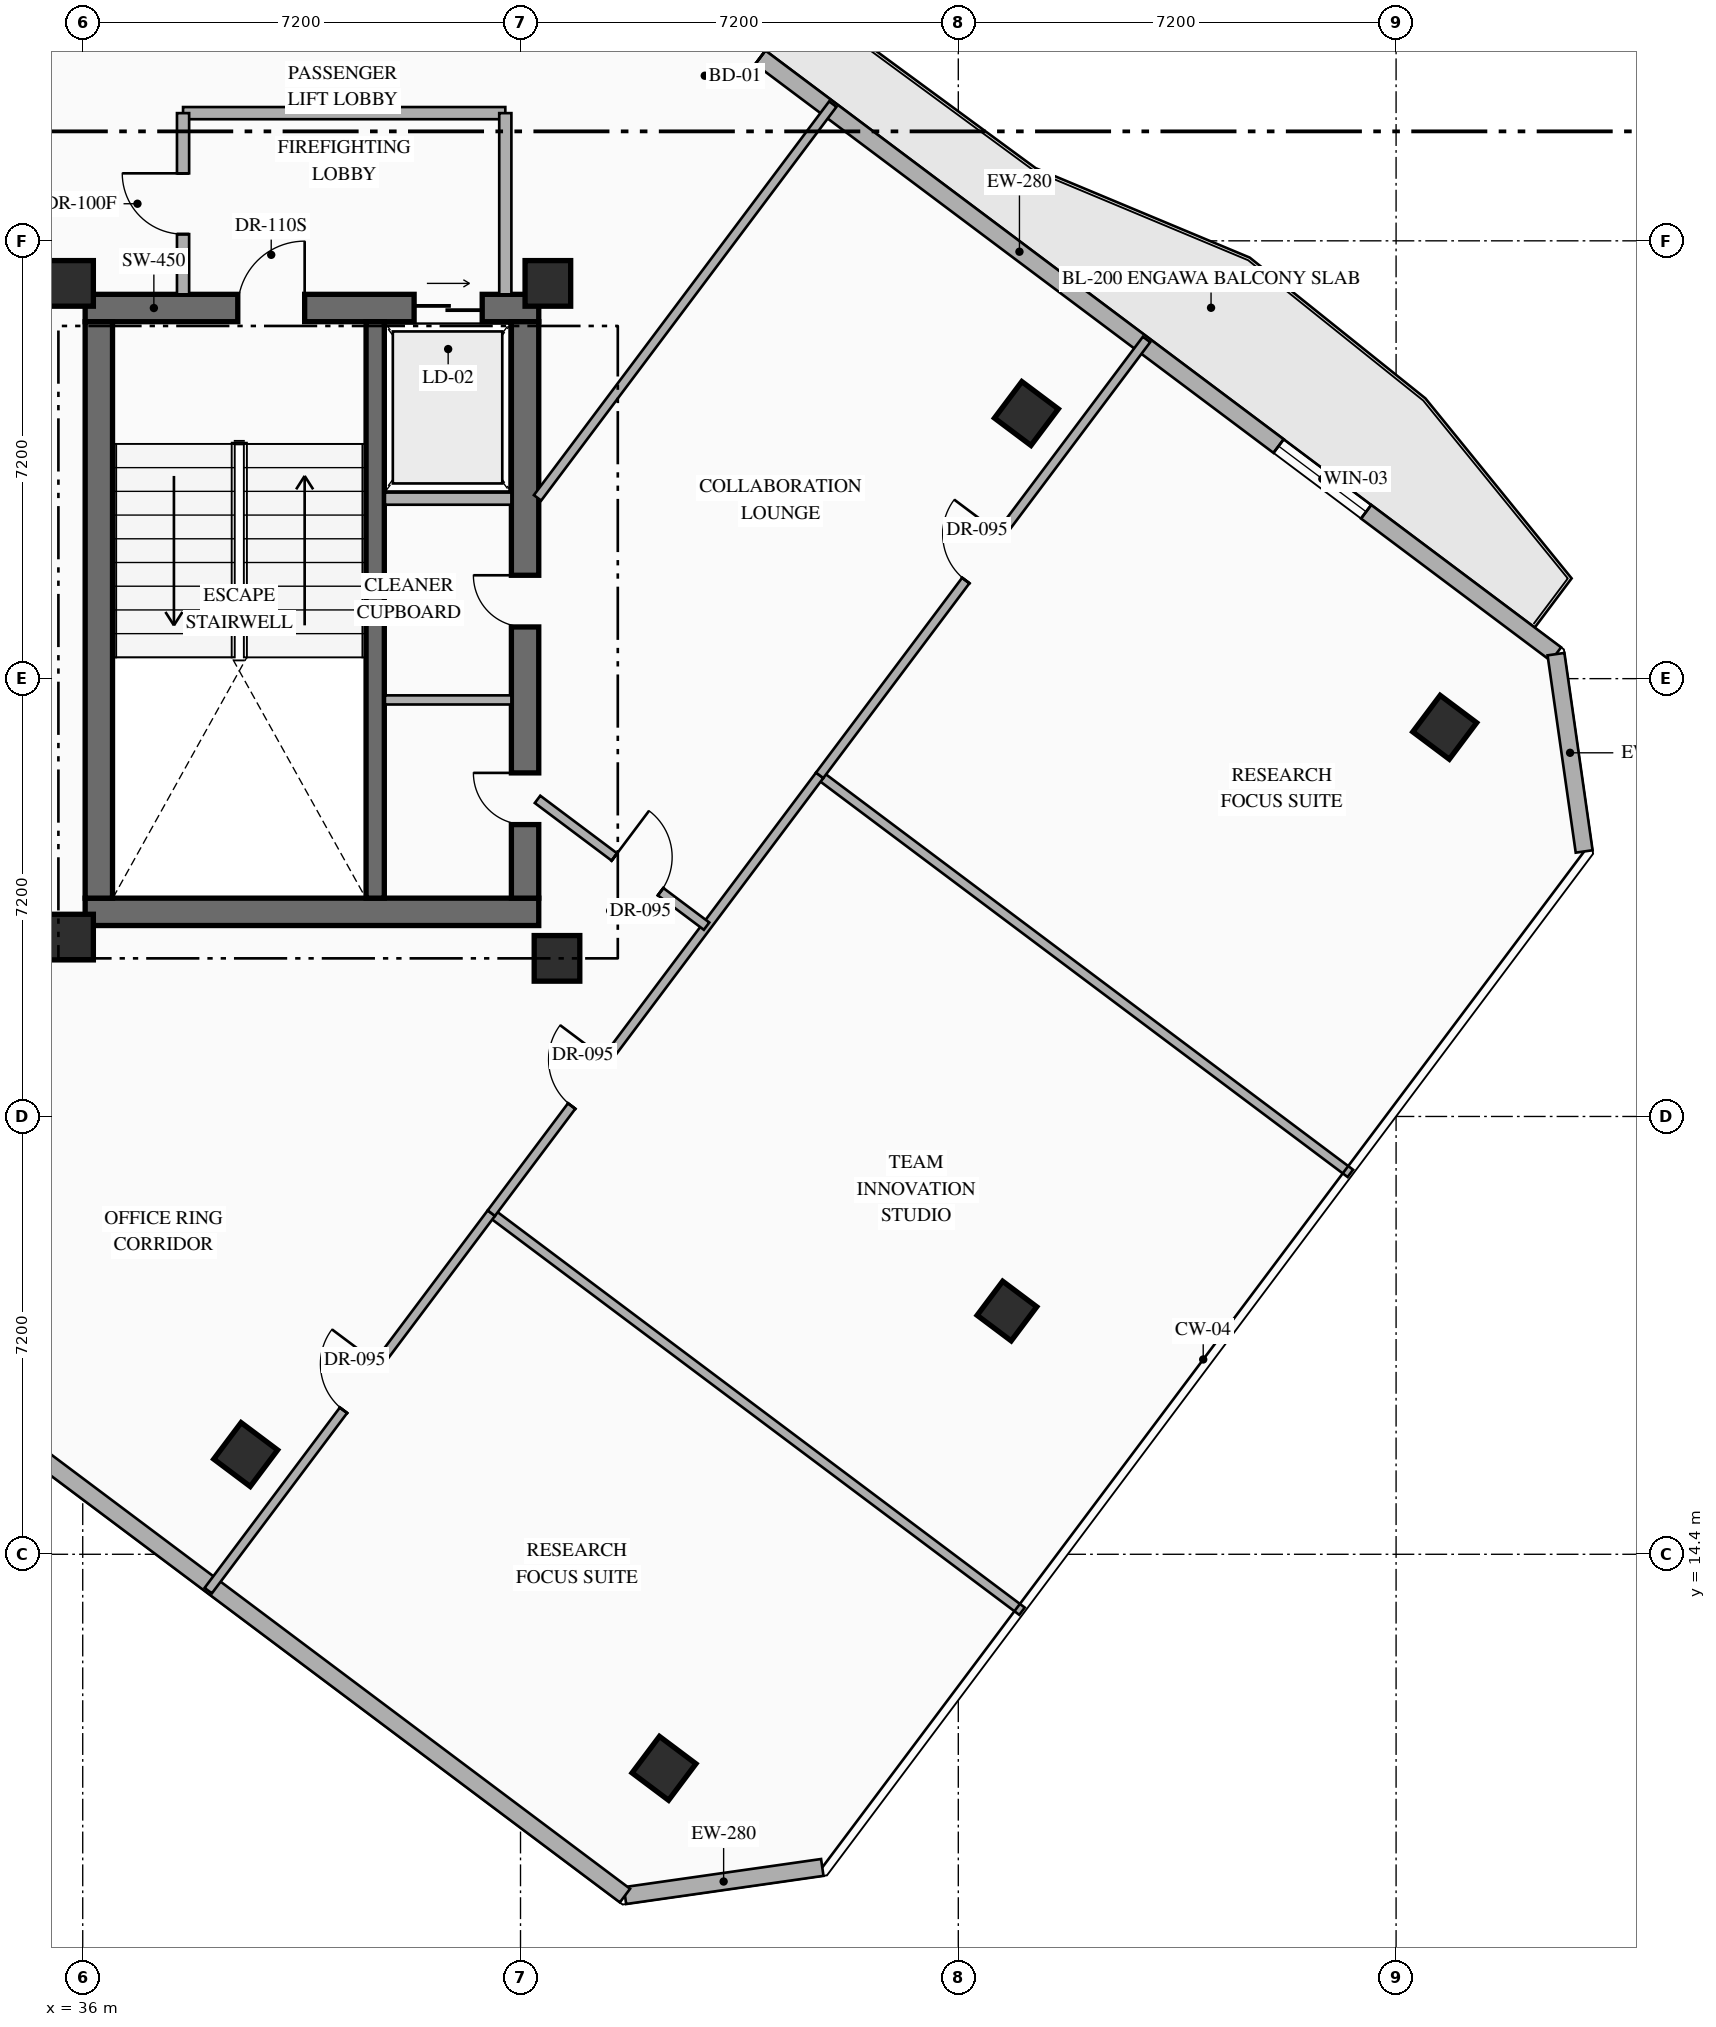
"""IFC4 building model, lengths in metres.
Left out: names, types, materials, properties, quantities, classifications, styles, units other than length and angle.
Written with IfcOpenShell. Run it as: python <this file> out.ifc"""

import sys

from ifc_helpers import new_model, si_unit, direction, frame, frame_2d, origin, origin_2d, place, context, subcontext, project, spatial, rectangle, hollow_rectangle, extrude, element, fill, save


model = new_model("IFC4")
c1 = context("Model", 3, precision=1e-05, world=origin(), true_north=direction((0.0, 1.0)))
c2 = subcontext(c1, "Body", "Model", "MODEL_VIEW")
j1 = project(units=[si_unit("LENGTHUNIT", "METRE"), si_unit("PLANEANGLEUNIT", "RADIAN")], contexts=[c1])
p1 = place(None, origin())
s1 = spatial("IfcSite", under=j1, at=p1, CompositionType="ELEMENT")
p2 = place(p1, origin())
s2 = spatial("IfcBuilding", under=s1, at=p2, CompositionType="ELEMENT")
p3 = place(p2, frame((0.0, 0.0, 213.15)))
s3 = spatial("IfcBuildingStorey", under=s2, at=p3, CompositionType="ELEMENT", Elevation=213.15)
p4 = place(p3, frame((36.04, 24.965, 0.0), z_axis=(0.0, 0.0, 1.0), x_axis=(1.0, 0.0, 0.0)))
e1 = element("IfcWall", 1, at=p4, inside=s3, PredefinedType="SHEAR", context=c2, shape_type="SweptSolid", body=[
    extrude(rectangle(XDim=7.46, YDim=0.45, at=frame_2d((3.73, 0.0))), origin(), (0.0, 0.0, 1.0), 3.6),
])
p5 = place(p3, frame((36.04, 34.895, 0.0), z_axis=(0.0, 0.0, 1.0), x_axis=(1.0, 0.0, 0.0)))
e2 = element("IfcWall", 2, at=p5, inside=s3, PredefinedType="SHEAR", context=c2, shape_type="SweptSolid", body=[
    extrude(rectangle(XDim=7.46, YDim=0.45, at=frame_2d((3.73, 0.0))), origin(), (0.0, 0.0, 1.0), 3.6),
])
p6 = place(p5, frame((2.51, 0.0, 0.0)))
e3 = element("IfcOpeningElement", 3, at=p6, cuts=e2, PredefinedType="OPENING", context=c2, shape_type="SweptSolid", body=[
    extrude(rectangle(XDim=1.1, YDim=2.2, at=frame_2d((0.55, 1.1))), frame((0.0, 0.235, 0.0), z_axis=(0.0, -1.0, 0.0), x_axis=(1.0, 0.0, 0.0)), (0.0, 0.0, 1.0), 0.47),
])
p7 = place(p5, frame((5.41, 0.0, 0.0)))
e4 = element("IfcOpeningElement", 4, at=p7, cuts=e2, PredefinedType="OPENING", context=c2, shape_type="SweptSolid", body=[
    extrude(rectangle(XDim=1.12, YDim=2.15, at=frame_2d((0.56, 1.075))), frame((0.0, 0.235, 0.0), z_axis=(0.0, -1.0, 0.0), x_axis=(1.0, 0.0, 0.0)), (0.0, 0.0, 1.0), 0.47),
])
p8 = place(p3, frame((36.265, 25.19, 0.0), z_axis=(0.0, 0.0, 1.0), x_axis=(0.0, 1.0, 0.0)))
e5 = element("IfcWall", 5, at=p8, inside=s3, PredefinedType="SHEAR", context=c2, shape_type="SweptSolid", body=[
    extrude(rectangle(XDim=9.48, YDim=0.45, at=frame_2d((4.74, 0.0))), origin(), (0.0, 0.0, 1.0), 3.6),
])
p9 = place(p3, frame((43.275, 25.19, 0.0), z_axis=(0.0, 0.0, 1.0), x_axis=(0.0, 1.0, 0.0)))
e6 = element("IfcWall", 6, at=p9, inside=s3, PredefinedType="SHEAR", context=c2, shape_type="SweptSolid", body=[
    extrude(rectangle(XDim=9.48, YDim=0.45, at=frame_2d((4.74, 0.0))), origin(), (0.0, 0.0, 1.0), 3.6),
])
p10 = place(p9, frame((1.21, 0.0, 0.0)))
e7 = element("IfcOpeningElement", 7, at=p10, cuts=e6, PredefinedType="OPENING", context=c2, shape_type="SweptSolid", body=[
    extrude(rectangle(XDim=0.85, YDim=2.08, at=frame_2d((0.425, 1.04))), frame((0.0, 0.235, 0.0), z_axis=(0.0, -1.0, 0.0), x_axis=(1.0, 0.0, 0.0)), (0.0, 0.0, 1.0), 0.47),
])
p11 = place(p9, frame((4.46, 0.0, 0.0)))
e8 = element("IfcOpeningElement", 8, at=p11, cuts=e6, PredefinedType="OPENING", context=c2, shape_type="SweptSolid", body=[
    extrude(rectangle(XDim=0.85, YDim=2.08, at=frame_2d((0.425, 1.04))), frame((0.0, 0.235, 0.0), z_axis=(0.0, -1.0, 0.0), x_axis=(1.0, 0.0, 0.0)), (0.0, 0.0, 1.0), 0.47),
])
p12 = place(p3, frame((40.81, 25.19, 0.0), z_axis=(0.0, 0.0, 1.0), x_axis=(0.0, 1.0, 0.0)))
e9 = element("IfcWall", 9, at=p12, inside=s3, PredefinedType="SHEAR", context=c2, shape_type="SweptSolid", body=[
    extrude(rectangle(XDim=9.48, YDim=0.3, at=frame_2d((4.74, 0.0))), origin(), (0.0, 0.0, 1.0), 3.6),
])
for number, where, z_axis, x_axis in (
    (10, (35.8, 24.55, 0.0), (0.0, 0.0, 1.0), (1.0, 0.0, 0.0)),
    (11, (43.8, 24.2, 0.0), (0.0, 0.0, 1.0), (1.0, 0.0, 0.0)),
    (12, (35.8, 35.3, 0.0), (0.0, 0.0, 1.0), (1.0, 0.0, 0.0)),
    (13, (43.65, 35.3, 0.0), (0.0, 0.0, 1.0), (1.0, 0.0, 0.0)),
    (14, (38.68, 16.04, 0.0), (0.0, 0.0, 1.0), (0.8, -0.6, 0.0)),
    (15, (51.52, 33.16, 0.0), (0.0, 0.0, 1.0), (0.8, -0.6, 0.0)),
    (16, (45.56, 10.88, 0.0), (0.0, 0.0, 1.0), (0.8, -0.6, 0.0)),
    (17, (58.4, 28.0, 0.0), (0.0, 0.0, 1.0), (0.8, -0.6, 0.0)),
):
    element("IfcColumn", number, at=place(p3, frame(where, z_axis=z_axis, x_axis=x_axis)), inside=s3, PredefinedType="COLUMN", context=c2, shape_type="SweptSolid", body=[
        extrude(hollow_rectangle(XDim=0.75, YDim=0.75, WallThickness=0.028, at=origin_2d()), origin(), (0.0, 0.0, 1.0), 3.6),
    ])
p13 = place(p3, frame((51.2, 18.4, 0.0), z_axis=(0.0, 0.0, 1.0), x_axis=(0.799999996291, -0.600000004945, 0.0)))
e18 = element("IfcColumn", 18, at=p13, inside=s3, PredefinedType="COLUMN", context=c2, shape_type="SweptSolid", body=[
    extrude(hollow_rectangle(XDim=0.7, YDim=0.7, WallThickness=0.028, at=origin_2d()), origin(), (0.0, 0.0, 1.0), 3.6),
])
p14 = place(p3, frame((44.86, 40.73, 0.0), z_axis=(0.0, 0.0, 1.0), x_axis=(0.800007624502, -0.599989833863, 0.0)))
e19 = element("IfcWall", 19, at=p14, inside=s3, PredefinedType="STANDARD", context=c2, shape_type="SweptSolid", body=[
    extrude(rectangle(XDim=19.212, YDim=0.28, at=frame_2d((9.606, 0.0))), origin(), (0.0, 0.0, 1.0), 3.35),
])
p15 = place(p14, frame((1.755, 0.0, 0.0)))
e20 = element("IfcOpeningElement", 20, at=p15, cuts=e19, PredefinedType="OPENING", context=c2, shape_type="SweptSolid", body=[
    extrude(rectangle(XDim=1.1, YDim=2.2, at=frame_2d((0.55, 1.1))), frame((0.0, 0.15, 0.0), z_axis=(0.0, -1.0, 0.0), x_axis=(1.0, 0.0, 0.0)), (0.0, 0.0, 1.0), 0.3),
])
p16 = place(p14, frame((13.509, 0.0, 0.85)))
e21 = element("IfcOpeningElement", 21, at=p16, cuts=e19, PredefinedType="OPENING", context=c2, shape_type="SweptSolid", body=[
    extrude(rectangle(XDim=1.8, YDim=2.1, at=frame_2d((0.9, 1.05))), frame((0.0, 0.15, 0.0), z_axis=(0.0, -1.0, 0.0), x_axis=(1.0, 0.0, 0.0)), (0.0, 0.0, 1.0), 0.3),
])
p17 = place(p3, frame((60.23, 29.203, 0.0), z_axis=(0.0, 0.0, 1.0), x_axis=(0.141296221922, -0.989967361922, 0.0)))
e22 = element("IfcWall", 22, at=p17, inside=s3, PredefinedType="STANDARD", context=c2, shape_type="SweptSolid", body=[
    extrude(rectangle(XDim=3.278, YDim=0.28, at=frame_2d((1.639, 0.0))), origin(), (0.0, 0.0, 1.0), 3.35),
])
p18 = place(p3, frame((48.163, 9.25, 0.0), z_axis=(0.0, 0.0, 1.0), x_axis=(-0.989979263428, -0.141212810973, 0.0)))
e23 = element("IfcWall", 23, at=p18, inside=s3, PredefinedType="STANDARD", context=c2, shape_type="SweptSolid", body=[
    extrude(rectangle(XDim=3.278, YDim=0.28, at=frame_2d((1.639, 0.0))), origin(), (0.0, 0.0, 1.0), 3.35),
])
p19 = place(p3, frame((44.918, 8.787, 0.0), z_axis=(0.0, 0.0, 1.0), x_axis=(-0.800004765927, 0.599993645378, 0.0)))
e24 = element("IfcWall", 24, at=p19, inside=s3, PredefinedType="STANDARD", context=c2, shape_type="SweptSolid", body=[
    extrude(rectangle(XDim=24.588, YDim=0.28, at=frame_2d((12.294, 0.0))), origin(), (0.0, 0.0, 1.0), 3.35),
])
p20 = place(p3, frame((40.97, 31.76, 0.0), z_axis=(0.0, 0.0, 1.0), x_axis=(1.0, 0.0, 0.0)))
e25 = element("IfcWall", 25, at=p20, inside=s3, PredefinedType="STANDARD", context=c2, shape_type="SweptSolid", body=[
    extrude(rectangle(XDim=2.08, YDim=0.2, at=frame_2d((1.04, 0.0))), origin(), (0.0, 0.0, 1.0), 3.35),
])
p21 = place(p3, frame((40.97, 28.45, 0.0), z_axis=(0.0, 0.0, 1.0), x_axis=(1.0, 0.0, 0.0)))
e26 = element("IfcWall", 26, at=p21, inside=s3, PredefinedType="PARTITIONING", context=c2, shape_type="SweptSolid", body=[
    extrude(rectangle(XDim=2.08, YDim=0.15, at=frame_2d((1.04, 0.0))), origin(), (0.0, 0.0, 1.0), 3.35),
])
p22 = place(p3, frame((37.65, 38.1, 0.0), z_axis=(0.0, 0.0, 1.0), x_axis=(1.0, 0.0, 0.0)))
e27 = element("IfcWall", 27, at=p22, inside=s3, PredefinedType="STANDARD", context=c2, shape_type="SweptSolid", body=[
    extrude(rectangle(XDim=5.3, YDim=0.2, at=frame_2d((2.65, 0.0))), origin(), (0.0, 0.0, 1.0), 3.35),
])
p23 = place(p3, frame((42.95, 35.12, 0.0), z_axis=(0.0, 0.0, 1.0), x_axis=(0.0, 1.0, 0.0)))
e28 = element("IfcWall", 28, at=p23, inside=s3, PredefinedType="STANDARD", context=c2, shape_type="SweptSolid", body=[
    extrude(rectangle(XDim=2.98, YDim=0.2, at=frame_2d((1.49, 0.0))), origin(), (0.0, 0.0, 1.0), 3.35),
])
p24 = place(p3, frame((37.65, 35.12, 0.0), z_axis=(0.0, 0.0, 1.0), x_axis=(0.0, 1.0, 0.0)))
e29 = element("IfcWall", 29, at=p24, inside=s3, PredefinedType="STANDARD", context=c2, shape_type="SweptSolid", body=[
    extrude(rectangle(XDim=2.98, YDim=0.2, at=frame_2d((1.49, 0.0))), origin(), (0.0, 0.0, 1.0), 3.35),
])
p25 = place(p24, frame((0.99, 0.0, 0.0)))
e30 = element("IfcOpeningElement", 30, at=p25, cuts=e29, PredefinedType="OPENING", context=c2, shape_type="SweptSolid", body=[
    extrude(rectangle(XDim=1.0, YDim=2.2, at=frame_2d((0.5, 1.1))), frame((0.0, 0.11, 0.0), z_axis=(0.0, -1.0, 0.0), x_axis=(1.0, 0.0, 0.0)), (0.0, 0.0, 1.0), 0.22),
])
p26 = place(p3, frame((42.72, 20.01, 0.0), z_axis=(0.0, 0.0, 1.0), x_axis=(0.800005370633, -0.599992839089, 0.0)))
e31 = element("IfcWall", 31, at=p26, inside=s3, PredefinedType="PARTITIONING", context=c2, shape_type="SweptSolid", body=[
    extrude(rectangle(XDim=10.91, YDim=0.15, at=frame_2d((5.455, 0.0))), origin(), (0.0, 0.0, 1.0), 3.35),
])
p27 = place(p3, frame((38.064, 13.802, 0.0), z_axis=(0.0, 0.0, 1.0), x_axis=(0.6, 0.8, 0.0)))
e32 = element("IfcWall", 32, at=p27, inside=s3, PredefinedType="PARTITIONING", context=c2, shape_type="SweptSolid", body=[
    extrude(rectangle(XDim=7.76, YDim=0.15, at=frame_2d((3.88, 0.0))), origin(), (0.0, 0.0, 1.0), 3.35),
])
p28 = place(p27, frame((3.708, 0.0, 0.0)))
e33 = element("IfcOpeningElement", 33, at=p28, cuts=e32, PredefinedType="OPENING", context=c2, shape_type="SweptSolid", body=[
    extrude(rectangle(XDim=0.95, YDim=2.15, at=frame_2d((0.475, 1.075))), frame((0.0, 0.085, 0.0), z_axis=(0.0, -1.0, 0.0), x_axis=(1.0, 0.0, 0.0)), (0.0, 0.0, 1.0), 0.17),
])
p29 = place(p3, frame((48.12, 27.21, 0.0), z_axis=(0.0, 0.0, 1.0), x_axis=(0.799997314611, -0.600003580502, 0.0)))
e34 = element("IfcWall", 34, at=p29, inside=s3, PredefinedType="PARTITIONING", context=c2, shape_type="SweptSolid", body=[
    extrude(rectangle(XDim=10.91, YDim=0.15, at=frame_2d((5.455, 0.0))), origin(), (0.0, 0.0, 1.0), 3.045),
])
p30 = place(p3, frame((42.72, 20.01, 0.0), z_axis=(0.0, 0.0, 1.0), x_axis=(0.600013020683, 0.799990234322, 0.0)))
e35 = element("IfcWall", 35, at=p30, inside=s3, PredefinedType="PARTITIONING", context=c2, shape_type="SweptSolid", body=[
    extrude(rectangle(XDim=9.0, YDim=0.15, at=frame_2d((4.5, 0.0))), origin(), (0.0, 0.0, 1.0), 3.35),
])
p31 = place(p30, frame((2.202, 0.0, 0.0)))
e36 = element("IfcOpeningElement", 36, at=p31, cuts=e35, PredefinedType="OPENING", context=c2, shape_type="SweptSolid", body=[
    extrude(rectangle(XDim=0.95, YDim=2.15, at=frame_2d((0.475, 1.075))), frame((0.0, 0.085, 0.0), z_axis=(0.0, -1.0, 0.0), x_axis=(1.0, 0.0, 0.0)), (0.0, 0.0, 1.0), 0.17),
])
p32 = place(p3, frame((48.12, 27.21, 0.0), z_axis=(0.0, 0.0, 1.0), x_axis=(0.6, 0.8, 0.0)))
e37 = element("IfcWall", 37, at=p32, inside=s3, PredefinedType="PARTITIONING", context=c2, shape_type="SweptSolid", body=[
    extrude(rectangle(XDim=8.96, YDim=0.15, at=frame_2d((4.48, 0.0))), origin(), (0.0, 0.0, 1.0), 3.35),
])
p33 = place(p32, frame((4.005, 0.0, 0.0)))
e38 = element("IfcOpeningElement", 38, at=p33, cuts=e37, PredefinedType="OPENING", context=c2, shape_type="SweptSolid", body=[
    extrude(rectangle(XDim=0.95, YDim=2.15, at=frame_2d((0.475, 1.075))), frame((0.0, 0.085, 0.0), z_axis=(0.0, -1.0, 0.0), x_axis=(1.0, 0.0, 0.0)), (0.0, 0.0, 1.0), 0.17),
])
p34 = place(p3, frame((43.48, 26.815, 0.0), z_axis=(0.0, 0.0, 1.0), x_axis=(0.800008430676, -0.599988758934, 0.0)))
e39 = element("IfcWall", 39, at=p34, inside=s3, PredefinedType="PARTITIONING", context=c2, shape_type="SweptSolid", body=[
    extrude(rectangle(XDim=3.475, YDim=0.15, at=frame_2d((1.738, 0.0))), origin(), (0.0, 0.0, 1.0), 3.35),
])
p35 = place(p34, frame((1.58, 0.0, 0.0)))
e40 = element("IfcOpeningElement", 40, at=p35, cuts=e39, PredefinedType="OPENING", context=c2, shape_type="SweptSolid", body=[
    extrude(rectangle(XDim=0.95, YDim=2.15, at=frame_2d((0.475, 1.075))), frame((0.0, 0.085, 0.0), z_axis=(0.0, -1.0, 0.0), x_axis=(1.0, 0.0, 0.0)), (0.0, 0.0, 1.0), 0.17),
])
p36 = place(p3, frame((43.48, 31.773, 0.0), z_axis=(0.0, 0.0, 1.0), x_axis=(0.599971041729, 0.800021717885, 0.0)))
e41 = element("IfcWall", 41, at=p36, inside=s3, PredefinedType="PARTITIONING", context=c2, shape_type="SweptSolid", body=[
    extrude(rectangle(XDim=8.094, YDim=0.15, at=frame_2d((4.047, 0.0))), origin(), (0.0, 0.0, 1.0), 3.35),
])
p37 = place(p15, origin())
e42 = element("IfcDoor", 42, at=p37, inside=s3, OperationType="SINGLE_SWING_LEFT", PredefinedType="DOOR", context=c2, shape_type="SweptSolid", body=[
    extrude(rectangle(XDim=1.1, YDim=2.2, at=frame_2d((0.55, 1.1))), frame((0.0, 0.025, 0.0), z_axis=(0.0, -1.0, 0.0), x_axis=(1.0, 0.0, 0.0)), (0.0, 0.0, 1.0), 0.05),
])
fill(e20, e42)
p38 = place(p16, origin())
e43 = element("IfcWindow", 43, at=p38, inside=s3, PartitioningType="SINGLE_PANEL", PredefinedType="WINDOW", context=c2, shape_type="SweptSolid", body=[
    extrude(rectangle(XDim=1.8, YDim=2.1, at=frame_2d((0.9, 1.05))), frame((0.0, 0.03, 0.0), z_axis=(0.0, -1.0, 0.0), x_axis=(1.0, 0.0, 0.0)), (0.0, 0.0, 1.0), 0.06),
])
fill(e21, e43)
p39 = place(p6, origin())
e44 = element("IfcDoor", 44, at=p39, inside=s3, OperationType="SINGLE_SWING_RIGHT", PredefinedType="DOOR", context=c2, shape_type="SweptSolid", body=[
    extrude(rectangle(XDim=1.1, YDim=2.2, at=frame_2d((0.55, 1.1))), frame((0.0, 0.025, 0.0), z_axis=(0.0, -1.0, 0.0), x_axis=(1.0, 0.0, 0.0)), (0.0, 0.0, 1.0), 0.05),
])
fill(e3, e44)
p40 = place(p7, origin())
e45 = element("IfcDoor", 45, at=p40, inside=s3, OperationType="SLIDING_TO_RIGHT", PredefinedType="USERDEFINED", context=c2, shape_type="SweptSolid", body=[
    extrude(rectangle(XDim=1.12, YDim=2.15, at=frame_2d((0.56, 1.075))), frame((0.0, 0.025, 0.0), z_axis=(0.0, -1.0, 0.0), x_axis=(1.0, 0.0, 0.0)), (0.0, 0.0, 1.0), 0.05),
])
fill(e4, e45)
p41 = place(p10, origin())
e46 = element("IfcDoor", 46, at=p41, inside=s3, OperationType="SINGLE_SWING_RIGHT", PredefinedType="DOOR", context=c2, shape_type="SweptSolid", body=[
    extrude(rectangle(XDim=0.85, YDim=2.08, at=frame_2d((0.425, 1.04))), frame((0.0, 0.025, 0.0), z_axis=(0.0, -1.0, 0.0), x_axis=(1.0, 0.0, 0.0)), (0.0, 0.0, 1.0), 0.05),
])
fill(e7, e46)
p42 = place(p11, origin())
e47 = element("IfcDoor", 47, at=p42, inside=s3, OperationType="SINGLE_SWING_RIGHT", PredefinedType="DOOR", context=c2, shape_type="SweptSolid", body=[
    extrude(rectangle(XDim=0.85, YDim=2.08, at=frame_2d((0.425, 1.04))), frame((0.0, 0.025, 0.0), z_axis=(0.0, -1.0, 0.0), x_axis=(1.0, 0.0, 0.0)), (0.0, 0.0, 1.0), 0.05),
])
fill(e8, e47)
p43 = place(p25, origin())
e48 = element("IfcDoor", 48, at=p43, inside=s3, OperationType="SINGLE_SWING_RIGHT", PredefinedType="DOOR", context=c2, shape_type="SweptSolid", body=[
    extrude(rectangle(XDim=1.0, YDim=2.2, at=frame_2d((0.5, 1.1))), frame((0.0, 0.025, 0.0), z_axis=(0.0, -1.0, 0.0), x_axis=(1.0, 0.0, 0.0)), (0.0, 0.0, 1.0), 0.05),
])
fill(e30, e48)
p44 = place(p28, origin())
e49 = element("IfcDoor", 49, at=p44, inside=s3, OperationType="SINGLE_SWING_RIGHT", PredefinedType="DOOR", context=c2, shape_type="SweptSolid", body=[
    extrude(rectangle(XDim=0.95, YDim=2.15, at=frame_2d((0.475, 1.075))), frame((0.0, 0.025, 0.0), z_axis=(0.0, -1.0, 0.0), x_axis=(1.0, 0.0, 0.0)), (0.0, 0.0, 1.0), 0.05),
])
fill(e33, e49)
p45 = place(p31, origin())
e50 = element("IfcDoor", 50, at=p45, inside=s3, OperationType="SINGLE_SWING_RIGHT", PredefinedType="DOOR", context=c2, shape_type="SweptSolid", body=[
    extrude(rectangle(XDim=0.95, YDim=2.15, at=frame_2d((0.475, 1.075))), frame((0.0, 0.025, 0.0), z_axis=(0.0, -1.0, 0.0), x_axis=(1.0, 0.0, 0.0)), (0.0, 0.0, 1.0), 0.05),
])
fill(e36, e50)
p46 = place(p33, origin())
e51 = element("IfcDoor", 51, at=p46, inside=s3, OperationType="SINGLE_SWING_RIGHT", PredefinedType="DOOR", context=c2, shape_type="SweptSolid", body=[
    extrude(rectangle(XDim=0.95, YDim=2.15, at=frame_2d((0.475, 1.075))), frame((0.0, 0.025, 0.0), z_axis=(0.0, -1.0, 0.0), x_axis=(1.0, 0.0, 0.0)), (0.0, 0.0, 1.0), 0.05),
])
fill(e38, e51)
p47 = place(p35, origin())
e52 = element("IfcDoor", 52, at=p47, inside=s3, OperationType="SINGLE_SWING_LEFT", PredefinedType="DOOR", context=c2, shape_type="SweptSolid", body=[
    extrude(rectangle(XDim=0.95, YDim=2.15, at=frame_2d((0.475, 1.075))), frame((0.0, 0.025, 0.0), z_axis=(0.0, -1.0, 0.0), x_axis=(1.0, 0.0, 0.0)), (0.0, 0.0, 1.0), 0.05),
])
fill(e40, e52)
save(model, sys.argv[1])
